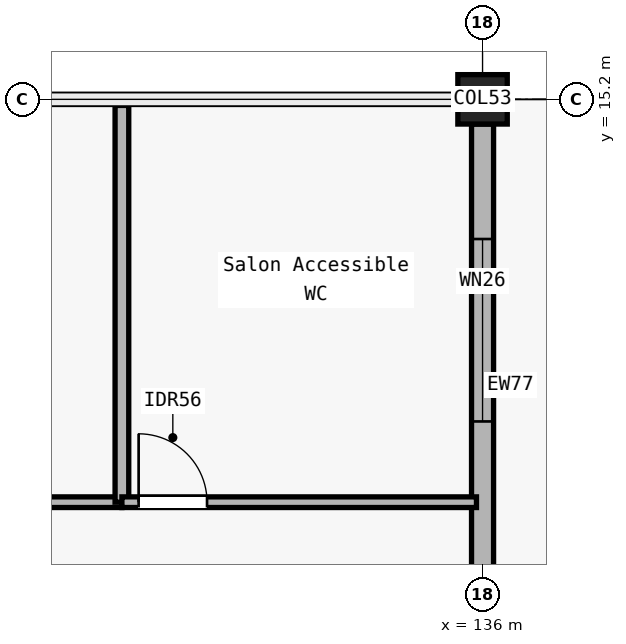
"""IFC4 building model, lengths in metres.
Left out: names, types, materials, properties, quantities, classifications, styles, units other than length and angle.
Written with IfcOpenShell. Run it as: python <this file> out.ifc"""

import sys

from ifc_helpers import new_model, si_unit, direction, frame, frame_2d, origin, origin_2d, place, context, subcontext, project, spatial, rectangle, circle, extrude, element, fill, save


model = new_model("IFC4")
c1 = context("Model", 3, precision=1e-05, world=origin(), true_north=direction((0.0, 1.0)))
c2 = subcontext(c1, "Body", "Model", "MODEL_VIEW")
j1 = project(units=[si_unit("LENGTHUNIT", "METRE"), si_unit("PLANEANGLEUNIT", "RADIAN")], contexts=[c1])
p1 = place(None, origin())
s1 = spatial("IfcSite", under=j1, at=p1, CompositionType="ELEMENT")
p2 = place(p1, origin())
s2 = spatial("IfcBuilding", under=s1, at=p2, CompositionType="ELEMENT")
p3 = place(p2, frame((0.0, 0.0, 15.0)))
s3 = spatial("IfcBuildingStorey", under=s2, at=p3, CompositionType="ELEMENT", Elevation=15.0)
p4 = place(p3, frame((136.0, 15.2, 0.0), z_axis=(0.0, 0.0, 1.0), x_axis=(1.0, 0.0, 0.0)))
e1 = element("IfcColumn", 1, at=p4, inside=s3, PredefinedType="COLUMN", context=c2, shape_type="SweptSolid", body=[
    extrude(circle(Radius=0.325, at=origin_2d()), origin(), (0.0, 0.0, 1.0), 4.8),
])
p5 = place(p3, frame((136.0, 14.875, 0.0), z_axis=(0.0, 0.0, 1.0), x_axis=(0.0, -1.0, 0.0)))
e2 = element("IfcWall", 2, at=p5, inside=s3, PredefinedType="SOLIDWALL", context=c2, shape_type="SweptSolid", body=[
    extrude(rectangle(XDim=6.875, YDim=0.29, at=frame_2d((3.438, 0.0))), origin(), (0.0, 0.0, 1.0), 4.14),
])
p6 = place(p5, frame((1.512, 0.0, 0.95)))
e3 = element("IfcOpeningElement", 3, at=p6, cuts=e2, PredefinedType="OPENING", context=c2, shape_type="SweptSolid", body=[
    extrude(rectangle(XDim=2.4, YDim=1.5, at=frame_2d((1.2, 0.75))), frame((0.0, 0.155, 0.0), z_axis=(0.0, -1.0, 0.0), x_axis=(1.0, 0.0, 0.0)), (0.0, 0.0, 1.0), 0.31),
])
p7 = place(p3, frame((120.304, 9.9, 0.0), z_axis=(0.0, 0.0, 1.0), x_axis=(1.0, 0.0, 0.0)))
e4 = element("IfcWall", 4, at=p7, inside=s3, PredefinedType="PARTITIONING", context=c2, shape_type="SweptSolid", body=[
    extrude(rectangle(XDim=10.951, YDim=0.14, at=frame_2d((5.476, 0.0))), origin(), (0.0, 0.0, 1.0), 3.9),
])
p8 = place(p7, frame((3.073, 0.0, 0.0)))
e5 = element("IfcOpeningElement", 5, at=p8, cuts=e4, PredefinedType="OPENING", context=c2, shape_type="SweptSolid", body=[
    extrude(rectangle(XDim=0.98, YDim=2.05, at=frame_2d((0.49, 1.025))), frame((0.0, 0.08, 0.0), z_axis=(0.0, -1.0, 0.0), x_axis=(1.0, 0.0, 0.0)), (0.0, 0.0, 1.0), 0.16),
])
p9 = place(p3, frame((131.255, 9.9, 0.0), z_axis=(0.0, 0.0, 1.0), x_axis=(0.0, 1.0, 0.0)))
e6 = element("IfcWall", 6, at=p9, inside=s3, PredefinedType="PARTITIONING", context=c2, shape_type="SweptSolid", body=[
    extrude(rectangle(XDim=5.22, YDim=0.18, at=frame_2d((2.61, 0.0))), origin(), (0.0, 0.0, 1.0), 3.9),
])
p10 = place(p3, frame((131.255, 9.9, 0.0), z_axis=(0.0, 0.0, 1.0), x_axis=(1.0, 0.0, 0.0)))
e7 = element("IfcWall", 7, at=p10, inside=s3, PredefinedType="PARTITIONING", context=c2, shape_type="SweptSolid", body=[
    extrude(rectangle(XDim=4.665, YDim=0.14, at=frame_2d((2.333, 0.0))), origin(), (0.0, 0.0, 1.0), 3.9),
])
p11 = place(p10, frame((0.22, 0.0, 0.0)))
e8 = element("IfcOpeningElement", 8, at=p11, cuts=e7, PredefinedType="OPENING", context=c2, shape_type="SweptSolid", body=[
    extrude(rectangle(XDim=0.9, YDim=2.1, at=frame_2d((0.45, 1.05))), frame((0.0, 0.08, 0.0), z_axis=(0.0, -1.0, 0.0), x_axis=(1.0, 0.0, 0.0)), (0.0, 0.0, 1.0), 0.16),
])
p12 = place(p6, origin())
e9 = element("IfcWindow", 9, at=p12, inside=s3, PartitioningType="DOUBLE_PANEL_VERTICAL", PredefinedType="WINDOW", context=c2, shape_type="SweptSolid", body=[
    extrude(rectangle(XDim=2.4, YDim=1.5, at=frame_2d((1.2, 0.75))), frame((0.0, 0.03, 0.0), z_axis=(0.0, -1.0, 0.0), x_axis=(1.0, 0.0, 0.0)), (0.0, 0.0, 1.0), 0.06),
])
fill(e3, e9)
p13 = place(p11, origin())
e10 = element("IfcDoor", 10, at=p13, inside=s3, OperationType="SINGLE_SWING_LEFT", PredefinedType="DOOR", context=c2, shape_type="SweptSolid", body=[
    extrude(rectangle(XDim=0.9, YDim=2.1, at=frame_2d((0.45, 1.05))), frame((0.0, 0.025, 0.0), z_axis=(0.0, -1.0, 0.0), x_axis=(1.0, 0.0, 0.0)), (0.0, 0.0, 1.0), 0.05),
])
fill(e8, e10)
save(model, sys.argv[1])
